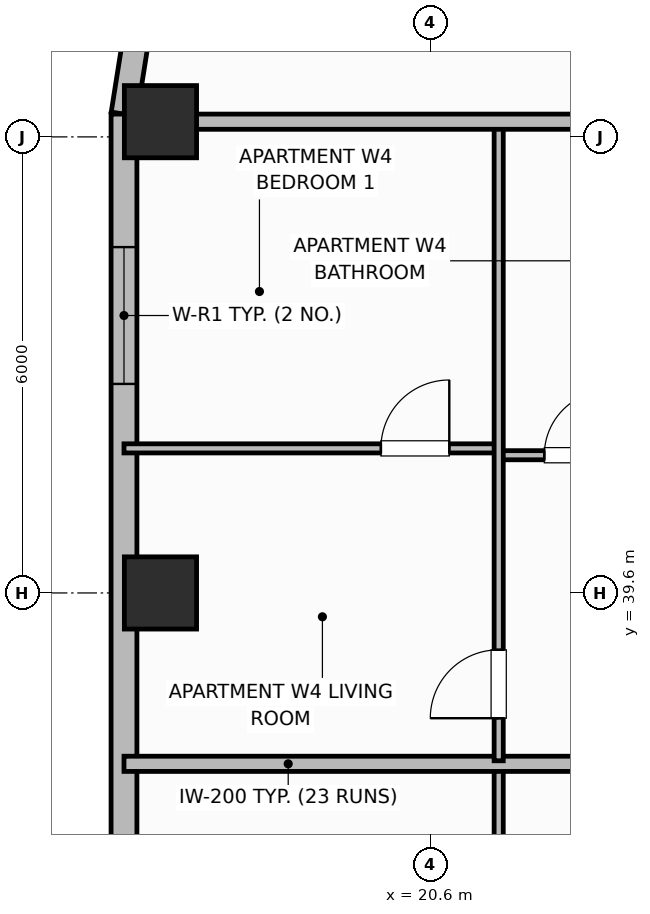
"""IFC4 building model, lengths in metres.
Left out: names, types, materials, properties, quantities, classifications, styles, units other than length and angle.
Written with IfcOpenShell. Run it as: python <this file> out.ifc"""

import sys

from ifc_helpers import new_model, si_unit, direction, frame, frame_2d, origin, origin_2d, place, context, subcontext, project, spatial, rectangle, extrude, element, fill, save


model = new_model("IFC4")
c1 = context("Model", 3, precision=1e-05, world=origin(), true_north=direction((0.0, 1.0)))
c2 = subcontext(c1, "Body", "Model", "MODEL_VIEW")
j1 = project(units=[si_unit("LENGTHUNIT", "METRE"), si_unit("PLANEANGLEUNIT", "RADIAN")], contexts=[c1])
p1 = place(None, origin())
s1 = spatial("IfcSite", under=j1, at=p1, CompositionType="ELEMENT")
p2 = place(p1, origin())
s2 = spatial("IfcBuilding", under=s1, at=p2, CompositionType="ELEMENT")
p3 = place(p2, frame((0.0, 0.0, 166.3)))
s3 = spatial("IfcBuildingStorey", under=s2, at=p3, CompositionType="ELEMENT", Elevation=166.3)
for number, where, z_axis, x_axis in (
    (1, (17.05, 39.6, 0.0), (0.0, 0.0, 1.0), (1.0, 0.0, 0.0)),
    (2, (17.05, 45.8, 0.0), (0.0, 0.0, 1.0), (1.0, 0.0, 0.0)),
):
    element("IfcColumn", number, at=place(p3, frame(where, z_axis=z_axis, x_axis=x_axis)), inside=s3, PredefinedType="COLUMN", context=c2, shape_type="SweptSolid", body=[
        extrude(rectangle(XDim=0.95, YDim=0.95, at=origin_2d()), origin(), (0.0, 0.0, 1.0), 3.7),
    ])
p4 = place(p3, frame((16.748, 47.022, 0.0), z_axis=(0.0, 0.0, 1.0), x_axis=(-0.156481329164, -0.987680916907, 0.0)))
e3 = element("IfcWall", 3, at=p4, inside=s3, PredefinedType="SOLIDWALL", context=c2, shape_type="SweptSolid", body=[
    extrude(rectangle(XDim=1.136, YDim=0.34, at=frame_2d((0.568, 0.0))), origin(), (0.0, 0.0, 1.0), 2.72),
])
p5 = place(p3, frame((16.57, 45.9, 0.0), z_axis=(0.0, 0.0, 1.0), x_axis=(0.0, -1.0, 0.0)))
e4 = element("IfcWall", 4, at=p5, inside=s3, PredefinedType="SOLIDWALL", context=c2, shape_type="SweptSolid", body=[
    extrude(rectangle(XDim=13.3, YDim=0.34, at=frame_2d((6.65, 0.0))), origin(), (0.0, 0.0, 1.0), 2.72),
])
p6 = place(p5, frame((1.75, 0.0, 0.75)))
e5 = element("IfcOpeningElement", 5, at=p6, cuts=e4, PredefinedType="OPENING", context=c2, shape_type="SweptSolid", body=[
    extrude(rectangle(XDim=1.8, YDim=1.85, at=frame_2d((0.9, 0.925))), frame((0.0, 0.18, 0.0), z_axis=(0.0, -1.0, 0.0), x_axis=(1.0, 0.0, 0.0)), (0.0, 0.0, 1.0), 0.36),
])
p7 = place(p5, frame((9.75, 0.0, 0.75)))
e6 = element("IfcOpeningElement", 6, at=p7, cuts=e4, PredefinedType="OPENING", context=c2, shape_type="SweptSolid", body=[
    extrude(rectangle(XDim=1.8, YDim=1.85, at=frame_2d((0.9, 0.925))), frame((0.0, 0.18, 0.0), z_axis=(0.0, -1.0, 0.0), x_axis=(1.0, 0.0, 0.0)), (0.0, 0.0, 1.0), 0.36),
])
p8 = place(p3, frame((21.5, 29.84, 0.0), z_axis=(0.0, 0.0, 1.0), x_axis=(0.0, 1.0, 0.0)))
e7 = element("IfcWall", 7, at=p8, inside=s3, PredefinedType="PARTITIONING", context=c2, shape_type="SweptSolid", body=[
    extrude(rectangle(XDim=7.472, YDim=0.12, at=frame_2d((3.736, 0.0))), origin(), (0.0, 0.0, 1.0), 2.55),
])
p9 = place(p8, frame((0.61, 0.0, 0.0)))
e8 = element("IfcOpeningElement", 8, at=p9, cuts=e7, PredefinedType="OPENING", context=c2, shape_type="SweptSolid", body=[
    extrude(rectangle(XDim=0.9, YDim=2.1, at=frame_2d((0.45, 1.05))), frame((0.0, 0.07, 0.0), z_axis=(0.0, -1.0, 0.0), x_axis=(1.0, 0.0, 0.0)), (0.0, 0.0, 1.0), 0.14),
])
p10 = place(p3, frame((16.57, 37.352, 0.0), z_axis=(0.0, 0.0, 1.0), x_axis=(1.0, 0.0, 0.0)))
e9 = element("IfcWall", 9, at=p10, inside=s3, PredefinedType="PARTITIONING", context=c2, shape_type="SweptSolid", body=[
    extrude(rectangle(XDim=7.18, YDim=0.2, at=frame_2d((3.59, 0.0))), origin(), (0.0, 0.0, 1.0), 2.55),
])
p11 = place(p3, frame((21.5, 41.412, 0.0), z_axis=(0.0, 0.0, 1.0), x_axis=(1.0, 0.0, 0.0)))
e10 = element("IfcWall", 10, at=p11, inside=s3, PredefinedType="PARTITIONING", context=c2, shape_type="SweptSolid", body=[
    extrude(rectangle(XDim=2.25, YDim=0.12, at=frame_2d((1.125, 0.0))), origin(), (0.0, 0.0, 1.0), 2.55),
])
p12 = place(p11, frame((0.6, 0.0, 0.0)))
e11 = element("IfcOpeningElement", 11, at=p12, cuts=e10, PredefinedType="OPENING", context=c2, shape_type="SweptSolid", body=[
    extrude(rectangle(XDim=0.85, YDim=2.1, at=frame_2d((0.425, 1.05))), frame((0.0, 0.07, 0.0), z_axis=(0.0, -1.0, 0.0), x_axis=(1.0, 0.0, 0.0)), (0.0, 0.0, 1.0), 0.14),
])
p13 = place(p3, frame((16.57, 41.502, 0.0), z_axis=(0.0, 0.0, 1.0), x_axis=(1.0, 0.0, 0.0)))
e12 = element("IfcWall", 12, at=p13, inside=s3, PredefinedType="PARTITIONING", context=c2, shape_type="SweptSolid", body=[
    extrude(rectangle(XDim=4.93, YDim=0.12, at=frame_2d((2.465, 0.0))), origin(), (0.0, 0.0, 1.0), 2.55),
])
p14 = place(p13, frame((3.38, 0.0, 0.0)))
e13 = element("IfcOpeningElement", 13, at=p14, cuts=e12, PredefinedType="OPENING", context=c2, shape_type="SweptSolid", body=[
    extrude(rectangle(XDim=0.9, YDim=2.1, at=frame_2d((0.45, 1.05))), frame((0.0, 0.07, 0.0), z_axis=(0.0, -1.0, 0.0), x_axis=(1.0, 0.0, 0.0)), (0.0, 0.0, 1.0), 0.14),
])
p15 = place(p3, frame((21.5, 37.392, 0.0), z_axis=(0.0, 0.0, 1.0), x_axis=(0.0, 1.0, 0.0)))
e14 = element("IfcWall", 14, at=p15, inside=s3, PredefinedType="PARTITIONING", context=c2, shape_type="SweptSolid", body=[
    extrude(rectangle(XDim=8.368, YDim=0.12, at=frame_2d((4.184, 0.0))), origin(), (0.0, 0.0, 1.0), 2.55),
])
p16 = place(p15, frame((0.56, 0.0, 0.0)))
e15 = element("IfcOpeningElement", 15, at=p16, cuts=e14, PredefinedType="OPENING", context=c2, shape_type="SweptSolid", body=[
    extrude(rectangle(XDim=0.9, YDim=2.1, at=frame_2d((0.45, 1.05))), frame((0.0, 0.07, 0.0), z_axis=(0.0, -1.0, 0.0), x_axis=(1.0, 0.0, 0.0)), (0.0, 0.0, 1.0), 0.14),
])
p17 = place(p3, frame((16.99, 45.8, 0.0), z_axis=(0.0, 0.0, 1.0), x_axis=(1.0, 0.0, 0.0)))
e16 = element("IfcWall", 16, at=p17, inside=s3, PredefinedType="PARTITIONING", context=c2, shape_type="SweptSolid", body=[
    extrude(rectangle(XDim=6.76, YDim=0.2, at=frame_2d((3.38, 0.0))), origin(), (0.0, 0.0, 1.0), 2.55),
])
p18 = place(p6, origin())
e17 = element("IfcWindow", 17, at=p18, inside=s3, PartitioningType="SINGLE_PANEL", PredefinedType="WINDOW", context=c2, shape_type="SweptSolid", body=[
    extrude(rectangle(XDim=1.8, YDim=1.85, at=frame_2d((0.9, 0.925))), frame((0.0, 0.03, 0.0), z_axis=(0.0, -1.0, 0.0), x_axis=(1.0, 0.0, 0.0)), (0.0, 0.0, 1.0), 0.06),
])
fill(e5, e17)
p19 = place(p12, origin())
e18 = element("IfcDoor", 18, at=p19, inside=s3, OperationType="SINGLE_SWING_RIGHT", PredefinedType="DOOR", context=c2, shape_type="SweptSolid", body=[
    extrude(rectangle(XDim=0.85, YDim=2.1, at=frame_2d((0.425, 1.05))), frame((0.0, 0.025, 0.0), z_axis=(0.0, -1.0, 0.0), x_axis=(1.0, 0.0, 0.0)), (0.0, 0.0, 1.0), 0.05),
])
fill(e11, e18)
p20 = place(p14, origin())
e19 = element("IfcDoor", 19, at=p20, inside=s3, OperationType="SINGLE_SWING_RIGHT", PredefinedType="DOOR", context=c2, shape_type="SweptSolid", body=[
    extrude(rectangle(XDim=0.9, YDim=2.1, at=frame_2d((0.45, 1.05))), frame((0.0, 0.025, 0.0), z_axis=(0.0, -1.0, 0.0), x_axis=(1.0, 0.0, 0.0)), (0.0, 0.0, 1.0), 0.05),
])
fill(e13, e19)
p21 = place(p16, origin())
e20 = element("IfcDoor", 20, at=p21, inside=s3, OperationType="SINGLE_SWING_LEFT", PredefinedType="DOOR", context=c2, shape_type="SweptSolid", body=[
    extrude(rectangle(XDim=0.9, YDim=2.1, at=frame_2d((0.45, 1.05))), frame((0.0, 0.025, 0.0), z_axis=(0.0, -1.0, 0.0), x_axis=(1.0, 0.0, 0.0)), (0.0, 0.0, 1.0), 0.05),
])
fill(e15, e20)
save(model, sys.argv[1])
